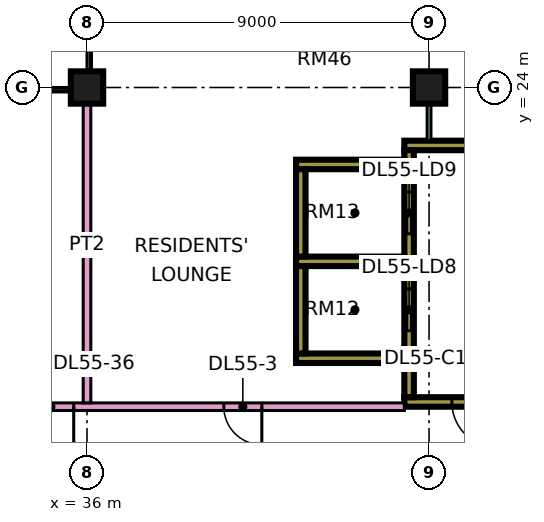
"""IFC4 building model, lengths in metres.
Left out: names, types, materials, properties, quantities, classifications, styles, units other than length and angle.
Written with IfcOpenShell. Run it as: python <this file> out.ifc"""

import sys

from ifc_helpers import new_model, si_unit, direction, frame, frame_2d, origin, origin_2d, place, context, subcontext, project, spatial, rectangle, extrude, element, fill, save


model = new_model("IFC4")
c1 = context("Model", 3, precision=1e-05, world=origin(), true_north=direction((0.0, 1.0)))
c2 = subcontext(c1, "Body", "Model", "MODEL_VIEW")
j1 = project(units=[si_unit("LENGTHUNIT", "METRE"), si_unit("PLANEANGLEUNIT", "RADIAN")], contexts=[c1])
p1 = place(None, origin())
s1 = spatial("IfcSite", under=j1, at=p1, CompositionType="ELEMENT")
p2 = place(p1, origin())
s2 = spatial("IfcBuilding", under=s1, at=p2, CompositionType="ELEMENT")
p3 = place(p2, frame((0.0, 0.0, 234.15)))
s3 = spatial("IfcBuildingStorey", under=s2, at=p3, CompositionType="ELEMENT", Elevation=234.15)
for number, where, z_axis, x_axis in (
    (1, (36.0, 24.0, 0.0), (0.0, 0.0, 1.0), (1.0, 0.0, 0.0)),
    (2, (45.0, 24.0, 0.0), (0.0, 0.0, 1.0), (1.0, 0.0, 0.0)),
):
    element("IfcColumn", number, at=place(p3, frame(where, z_axis=z_axis, x_axis=x_axis)), inside=s3, PredefinedType="COLUMN", context=c2, shape_type="SweptSolid", body=[
        extrude(rectangle(XDim=0.85, YDim=0.85, at=origin_2d()), origin(), (0.0, 0.0, 1.0), 3.75),
    ])
p4 = place(p3, frame((44.35, 15.725, 0.0), z_axis=(0.0, 0.0, 1.0), x_axis=(1.0, 0.0, 0.0)))
e3 = element("IfcWall", 3, at=p4, inside=s3, PredefinedType="SHEAR", context=c2, shape_type="SweptSolid", body=[
    extrude(rectangle(XDim=3.425, YDim=0.25, at=frame_2d((1.712, 0.0))), origin(), (0.0, 0.0, 1.0), 3.75),
])
p5 = place(p4, frame((1.25, 0.0, 0.0)))
e4 = element("IfcOpeningElement", 4, at=p5, cuts=e3, PredefinedType="OPENING", context=c2, shape_type="SweptSolid", body=[
    extrude(rectangle(XDim=1.2, YDim=2.2, at=frame_2d((0.6, 1.1))), frame((0.0, 0.135, 0.0), z_axis=(0.0, -1.0, 0.0), x_axis=(1.0, 0.0, 0.0)), (0.0, 0.0, 1.0), 0.27),
])
p6 = place(p3, frame((44.35, 22.475, 0.0), z_axis=(0.0, 0.0, 1.0), x_axis=(1.0, 0.0, 0.0)))
e5 = element("IfcWall", 5, at=p6, inside=s3, PredefinedType="SHEAR", context=c2, shape_type="SweptSolid", body=[
    extrude(rectangle(XDim=3.425, YDim=0.25, at=frame_2d((1.712, 0.0))), origin(), (0.0, 0.0, 1.0), 3.75),
])
p7 = place(p3, frame((44.475, 15.85, 0.0), z_axis=(0.0, 0.0, 1.0), x_axis=(0.0, 1.0, 0.0)))
e6 = element("IfcWall", 6, at=p7, inside=s3, PredefinedType="SHEAR", context=c2, shape_type="SweptSolid", body=[
    extrude(rectangle(XDim=6.5, YDim=0.25, at=frame_2d((3.25, 0.0))), origin(), (0.0, 0.0, 1.0), 3.75),
])
p8 = place(p7, frame((1.75, 0.0, 0.0)))
e7 = element("IfcOpeningElement", 7, at=p8, cuts=e6, PredefinedType="OPENING", context=c2, shape_type="SweptSolid", body=[
    extrude(rectangle(XDim=1.1, YDim=2.2, at=frame_2d((0.55, 1.1))), frame((0.0, 0.135, 0.0), z_axis=(0.0, -1.0, 0.0), x_axis=(1.0, 0.0, 0.0)), (0.0, 0.0, 1.0), 0.27),
])
p9 = place(p7, frame((4.3, 0.0, 0.0)))
e8 = element("IfcOpeningElement", 8, at=p9, cuts=e6, PredefinedType="OPENING", context=c2, shape_type="SweptSolid", body=[
    extrude(rectangle(XDim=1.1, YDim=2.2, at=frame_2d((0.55, 1.1))), frame((0.0, 0.135, 0.0), z_axis=(0.0, -1.0, 0.0), x_axis=(1.0, 0.0, 0.0)), (0.0, 0.0, 1.0), 0.27),
])
for number, where, z_axis, x_axis in (
    (9, (41.5, 16.875, 0.0), (0.0, 0.0, 1.0), (1.0, 0.0, 0.0)),
    (10, (41.5, 19.425, 0.0), (0.0, 0.0, 1.0), (1.0, 0.0, 0.0)),
    (11, (41.5, 21.975, 0.0), (0.0, 0.0, 1.0), (1.0, 0.0, 0.0)),
):
    element("IfcWall", number, at=place(p3, frame(where, z_axis=z_axis, x_axis=x_axis)), inside=s3, PredefinedType="SHEAR", context=c2, shape_type="SweptSolid", body=[
        extrude(rectangle(XDim=2.85, YDim=0.25, at=frame_2d((1.425, 0.0))), origin(), (0.0, 0.0, 1.0), 3.75),
    ])
for number, where, z_axis, x_axis in (
    (12, (41.625, 17.0, 0.0), (0.0, 0.0, 1.0), (0.0, 1.0, 0.0)),
    (13, (41.625, 19.55, 0.0), (0.0, 0.0, 1.0), (0.0, 1.0, 0.0)),
):
    element("IfcWall", number, at=place(p3, frame(where, z_axis=z_axis, x_axis=x_axis)), inside=s3, PredefinedType="SHEAR", context=c2, shape_type="SweptSolid", body=[
        extrude(rectangle(XDim=2.3, YDim=0.25, at=frame_2d((1.15, 0.0))), origin(), (0.0, 0.0, 1.0), 3.75),
    ])
p10 = place(p3, frame((34.0, 15.6, 0.0), z_axis=(0.0, 0.0, 1.0), x_axis=(1.0, 0.0, 0.0)))
e14 = element("IfcWall", 14, at=p10, inside=s3, PredefinedType="PARTITIONING", context=c2, shape_type="SweptSolid", body=[
    extrude(rectangle(XDim=10.35, YDim=0.2, at=frame_2d((5.175, 0.0))), origin(), (0.0, 0.0, 1.0), 3.35),
])
p11 = place(p10, frame((5.6, 0.0, 0.0)))
e15 = element("IfcOpeningElement", 15, at=p11, cuts=e14, PredefinedType="OPENING", context=c2, shape_type="SweptSolid", body=[
    extrude(rectangle(XDim=1.0, YDim=2.1, at=frame_2d((0.5, 1.05))), frame((0.0, 0.11, 0.0), z_axis=(0.0, -1.0, 0.0), x_axis=(1.0, 0.0, 0.0)), (0.0, 0.0, 1.0), 0.22),
])
p12 = place(p10, frame((0.45, 0.0, 0.0)))
e16 = element("IfcOpeningElement", 16, at=p12, cuts=e14, PredefinedType="OPENING", context=c2, shape_type="SweptSolid", body=[
    extrude(rectangle(XDim=1.2, YDim=2.1, at=frame_2d((0.6, 1.05))), frame((0.0, 0.11, 0.0), z_axis=(0.0, -1.0, 0.0), x_axis=(1.0, 0.0, 0.0)), (0.0, 0.0, 1.0), 0.22),
])
p13 = place(p3, frame((36.0, 15.7, 0.0), z_axis=(0.0, 0.0, 1.0), x_axis=(0.0, 1.0, 0.0)))
e17 = element("IfcWall", 17, at=p13, inside=s3, PredefinedType="PARTITIONING", context=c2, shape_type="SweptSolid", body=[
    extrude(rectangle(XDim=8.3, YDim=0.2, at=frame_2d((4.15, 0.0))), origin(), (0.0, 0.0, 1.0), 3.35),
])
p14 = place(p3, frame((45.0, 22.6, 0.0), z_axis=(0.0, 0.0, 1.0), x_axis=(0.0, 1.0, 0.0)))
e18 = element("IfcWall", 18, at=p14, inside=s3, PredefinedType="PARTITIONING", context=c2, shape_type="SweptSolid", body=[
    extrude(rectangle(XDim=1.4, YDim=0.1, at=frame_2d((0.7, 0.0))), origin(), (0.0, 0.0, 1.0), 3.35),
])
p15 = place(p5, origin())
e19 = element("IfcDoor", 19, at=p15, inside=s3, OperationType="SINGLE_SWING_RIGHT", PredefinedType="DOOR", context=c2, shape_type="SweptSolid", body=[
    extrude(rectangle(XDim=1.2, YDim=2.2, at=frame_2d((0.6, 1.1))), frame((0.0, 0.025, 0.0), z_axis=(0.0, -1.0, 0.0), x_axis=(1.0, 0.0, 0.0)), (0.0, 0.0, 1.0), 0.05),
])
fill(e4, e19)
p16 = place(p8, origin())
e20 = element("IfcDoor", 20, at=p16, inside=s3, OperationType="DOUBLE_DOOR_SLIDING", PredefinedType="DOOR", context=c2, shape_type="SweptSolid", body=[
    extrude(rectangle(XDim=1.1, YDim=2.2, at=frame_2d((0.55, 1.1))), frame((0.0, 0.025, 0.0), z_axis=(0.0, -1.0, 0.0), x_axis=(1.0, 0.0, 0.0)), (0.0, 0.0, 1.0), 0.05),
])
fill(e7, e20)
p17 = place(p9, origin())
e21 = element("IfcDoor", 21, at=p17, inside=s3, OperationType="DOUBLE_DOOR_SLIDING", PredefinedType="DOOR", context=c2, shape_type="SweptSolid", body=[
    extrude(rectangle(XDim=1.1, YDim=2.2, at=frame_2d((0.55, 1.1))), frame((0.0, 0.025, 0.0), z_axis=(0.0, -1.0, 0.0), x_axis=(1.0, 0.0, 0.0)), (0.0, 0.0, 1.0), 0.05),
])
fill(e8, e21)
p18 = place(p11, origin())
e22 = element("IfcDoor", 22, at=p18, inside=s3, OperationType="SINGLE_SWING_RIGHT", PredefinedType="DOOR", context=c2, shape_type="SweptSolid", body=[
    extrude(rectangle(XDim=1.0, YDim=2.1, at=frame_2d((0.5, 1.05))), frame((0.0, 0.025, 0.0), z_axis=(0.0, -1.0, 0.0), x_axis=(1.0, 0.0, 0.0)), (0.0, 0.0, 1.0), 0.05),
])
fill(e15, e22)
p19 = place(p12, origin())
e23 = element("IfcDoor", 23, at=p19, inside=s3, OperationType="SINGLE_SWING_RIGHT", PredefinedType="DOOR", context=c2, shape_type="SweptSolid", body=[
    extrude(rectangle(XDim=1.2, YDim=2.1, at=frame_2d((0.6, 1.05))), frame((0.0, 0.025, 0.0), z_axis=(0.0, -1.0, 0.0), x_axis=(1.0, 0.0, 0.0)), (0.0, 0.0, 1.0), 0.05),
])
fill(e16, e23)
save(model, sys.argv[1])
